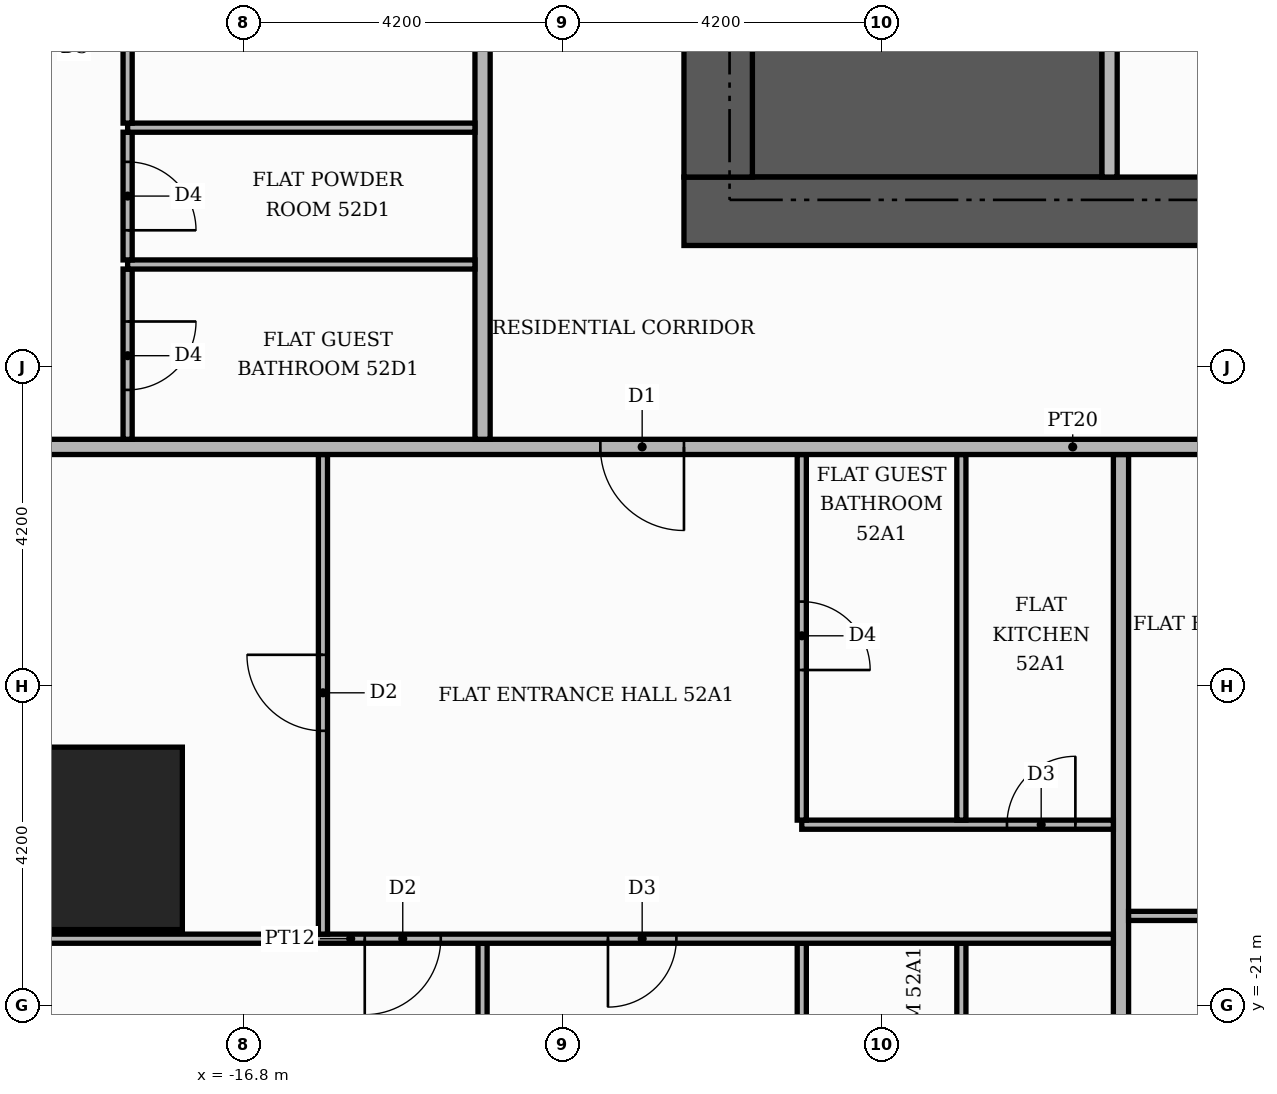
"""IFC4 building model, lengths in metres.
Left out: names, types, materials, properties, quantities, classifications, styles, units other than length and angle.
Written with IfcOpenShell. Run it as: python <this file> out.ifc"""

import sys

from ifc_helpers import new_model, si_unit, direction, frame, frame_2d, origin, origin_2d, place, context, subcontext, project, spatial, rectangle, extrude, element, fill, save


model = new_model("IFC4")
c1 = context("Model", 3, precision=1e-05, world=origin(), true_north=direction((0.0, 1.0)))
c2 = subcontext(c1, "Body", "Model", "MODEL_VIEW")
j1 = project(units=[si_unit("LENGTHUNIT", "METRE"), si_unit("PLANEANGLEUNIT", "RADIAN")], contexts=[c1])
p1 = place(None, origin())
s1 = spatial("IfcSite", under=j1, at=p1, CompositionType="ELEMENT")
p2 = place(p1, origin())
s2 = spatial("IfcBuilding", under=s1, at=p2, CompositionType="ELEMENT")
p3 = place(p2, frame((0.0, 0.0, 219.6)))
s3 = spatial("IfcBuildingStorey", under=s2, at=p3, CompositionType="ELEMENT", Elevation=219.6)
p4 = place(p3, frame((-10.1, -9.15, 0.0), z_axis=(0.0, 0.0, 1.0), x_axis=(1.0, 0.0, 0.0)))
e1 = element("IfcWall", 1, at=p4, inside=s3, PredefinedType="SHEAR", context=c2, shape_type="SweptSolid", body=[
    extrude(rectangle(XDim=4.6, YDim=1.9, at=frame_2d((2.3, 0.0))), origin(), (0.0, 0.0, 1.0), 3.48),
])
p5 = place(p3, frame((-11.0, -10.55, 0.0), z_axis=(0.0, 0.0, 1.0), x_axis=(1.0, 0.0, 0.0)))
e2 = element("IfcWall", 2, at=p5, inside=s3, PredefinedType="SHEAR", context=c2, shape_type="SweptSolid", body=[
    extrude(rectangle(XDim=22.0, YDim=0.9, at=frame_2d((11.0, 0.0))), origin(), (0.0, 0.0, 1.0), 3.48),
])
p6 = place(p5, frame((7.4, 0.0, 0.0)))
e3 = element("IfcOpeningElement", 3, at=p6, cuts=e2, PredefinedType="OPENING", context=c2, shape_type="SweptSolid", body=[
    extrude(rectangle(XDim=1.8, YDim=2.2, at=frame_2d((0.9, 1.1))), frame((0.0, 0.46, 0.0), z_axis=(0.0, -1.0, 0.0), x_axis=(1.0, 0.0, 0.0)), (0.0, 0.0, 1.0), 0.92),
])
p7 = place(p3, frame((-10.55, -10.1, 0.0), z_axis=(0.0, 0.0, 1.0), x_axis=(0.0, 1.0, 0.0)))
e4 = element("IfcWall", 4, at=p7, inside=s3, PredefinedType="SHEAR", context=c2, shape_type="SweptSolid", body=[
    extrude(rectangle(XDim=20.2, YDim=0.9, at=frame_2d((10.1, 0.0))), origin(), (0.0, 0.0, 1.0), 3.48),
])
p8 = place(p3, frame((-18.8, -18.8, 0.0), z_axis=(0.0, 0.0, 1.0), x_axis=(1.0, 0.0, 0.0)))
e5 = element("IfcColumn", 5, at=p8, inside=s3, PredefinedType="COLUMN", context=c2, shape_type="SweptSolid", body=[
    extrude(rectangle(XDim=2.4, YDim=2.4, at=origin_2d()), origin(), (0.0, 0.0, 1.0), 3.9),
])
p9 = place(p3, frame((-5.4, -10.1, 0.0), z_axis=(0.0, 0.0, 1.0), x_axis=(0.0, 1.0, 0.0)))
e6 = element("IfcWall", 6, at=p9, inside=s3, PredefinedType="PARTITIONING", context=c2, shape_type="SweptSolid", body=[
    extrude(rectangle(XDim=4.6, YDim=0.2, at=frame_2d((2.3, 0.0))), origin(), (0.0, 0.0, 1.0), 3.48),
])
p10 = place(p9, frame((2.9, 0.0, 0.0)))
e7 = element("IfcOpeningElement", 7, at=p10, cuts=e6, PredefinedType="OPENING", context=c2, shape_type="SweptSolid", body=[
    extrude(rectangle(XDim=1.0, YDim=2.1, at=frame_2d((0.5, 1.05))), frame((0.0, 0.11, 0.0), z_axis=(0.0, -1.0, 0.0), x_axis=(1.0, 0.0, 0.0)), (0.0, 0.0, 1.0), 0.22),
])
p11 = place(p3, frame((-13.65, -25.42, 0.0), z_axis=(0.0, 0.0, 1.0), x_axis=(0.0, 1.0, 0.0)))
e8 = element("IfcWall", 8, at=p11, inside=s3, PredefinedType="PARTITIONING", context=c2, shape_type="SweptSolid", body=[
    extrude(rectangle(XDim=5.24, YDim=0.12, at=frame_2d((2.62, 0.0))), origin(), (0.0, 0.0, 1.0), 3.48),
])
p12 = place(p3, frame((-9.45, -25.42, 0.0), z_axis=(0.0, 0.0, 1.0), x_axis=(0.0, 1.0, 0.0)))
e9 = element("IfcWall", 9, at=p12, inside=s3, PredefinedType="PARTITIONING", context=c2, shape_type="SweptSolid", body=[
    extrude(rectangle(XDim=5.24, YDim=0.12, at=frame_2d((2.62, 0.0))), origin(), (0.0, 0.0, 1.0), 3.48),
])
p13 = place(p12, frame((2.05, 0.0, 0.0)))
e10 = element("IfcOpeningElement", 10, at=p13, cuts=e9, PredefinedType="OPENING", context=c2, shape_type="SweptSolid", body=[
    extrude(rectangle(XDim=0.9, YDim=2.1, at=frame_2d((0.45, 1.05))), frame((0.0, 0.07, 0.0), z_axis=(0.0, -1.0, 0.0), x_axis=(1.0, 0.0, 0.0)), (0.0, 0.0, 1.0), 0.14),
])
p14 = place(p3, frame((-7.35, -25.42, 0.0), z_axis=(0.0, 0.0, 1.0), x_axis=(0.0, 1.0, 0.0)))
e11 = element("IfcWall", 11, at=p14, inside=s3, PredefinedType="PARTITIONING", context=c2, shape_type="SweptSolid", body=[
    extrude(rectangle(XDim=5.24, YDim=0.12, at=frame_2d((2.62, 0.0))), origin(), (0.0, 0.0, 1.0), 3.48),
])
p15 = place(p14, frame((2.05, 0.0, 0.0)))
e12 = element("IfcOpeningElement", 12, at=p15, cuts=e11, PredefinedType="OPENING", context=c2, shape_type="SweptSolid", body=[
    extrude(rectangle(XDim=0.9, YDim=2.1, at=frame_2d((0.45, 1.05))), frame((0.0, 0.07, 0.0), z_axis=(0.0, -1.0, 0.0), x_axis=(1.0, 0.0, 0.0)), (0.0, 0.0, 1.0), 0.14),
])
p16 = place(p3, frame((-5.25, -25.42, 0.0), z_axis=(0.0, 0.0, 1.0), x_axis=(0.0, 1.0, 0.0)))
e13 = element("IfcWall", 13, at=p16, inside=s3, PredefinedType="PARTITIONING", context=c2, shape_type="SweptSolid", body=[
    extrude(rectangle(XDim=11.67, YDim=0.2, at=frame_2d((5.835, 0.0))), origin(), (0.0, 0.0, 1.0), 3.48),
])
p17 = place(p3, frame((-25.42, -20.12, 0.0), z_axis=(0.0, 0.0, 1.0), x_axis=(1.0, 0.0, 0.0)))
e14 = element("IfcWall", 14, at=p17, inside=s3, PredefinedType="PARTITIONING", context=c2, shape_type="SweptSolid", body=[
    extrude(rectangle(XDim=20.07, YDim=0.12, at=frame_2d((10.035, 0.0))), origin(), (0.0, 0.0, 1.0), 3.48),
])
p18 = place(p17, frame((10.22, 0.0, 0.0)))
e15 = element("IfcOpeningElement", 15, at=p18, cuts=e14, PredefinedType="OPENING", context=c2, shape_type="SweptSolid", body=[
    extrude(rectangle(XDim=1.0, YDim=2.1, at=frame_2d((0.5, 1.05))), frame((0.0, 0.07, 0.0), z_axis=(0.0, -1.0, 0.0), x_axis=(1.0, 0.0, 0.0)), (0.0, 0.0, 1.0), 0.14),
])
p19 = place(p17, frame((13.42, 0.0, 0.0)))
e16 = element("IfcOpeningElement", 16, at=p19, cuts=e14, PredefinedType="OPENING", context=c2, shape_type="SweptSolid", body=[
    extrude(rectangle(XDim=0.9, YDim=2.1, at=frame_2d((0.45, 1.05))), frame((0.0, 0.07, 0.0), z_axis=(0.0, -1.0, 0.0), x_axis=(1.0, 0.0, 0.0)), (0.0, 0.0, 1.0), 0.14),
])
p20 = place(p3, frame((-15.75, -20.06, 0.0), z_axis=(0.0, 0.0, 1.0), x_axis=(0.0, 1.0, 0.0)))
e17 = element("IfcWall", 17, at=p20, inside=s3, PredefinedType="PARTITIONING", context=c2, shape_type="SweptSolid", body=[
    extrude(rectangle(XDim=6.31, YDim=0.12, at=frame_2d((3.155, 0.0))), origin(), (0.0, 0.0, 1.0), 3.48),
])
p21 = place(p20, frame((2.675, 0.0, 0.0)))
e18 = element("IfcOpeningElement", 18, at=p21, cuts=e17, PredefinedType="OPENING", context=c2, shape_type="SweptSolid", body=[
    extrude(rectangle(XDim=1.0, YDim=2.1, at=frame_2d((0.5, 1.05))), frame((0.0, 0.07, 0.0), z_axis=(0.0, -1.0, 0.0), x_axis=(1.0, 0.0, 0.0)), (0.0, 0.0, 1.0), 0.14),
])
p22 = place(p3, frame((-5.15, -19.82, 0.0), z_axis=(0.0, 0.0, 1.0), x_axis=(1.0, 0.0, 0.0)))
e19 = element("IfcWall", 19, at=p22, inside=s3, PredefinedType="PARTITIONING", context=c2, shape_type="SweptSolid", body=[
    extrude(rectangle(XDim=18.7, YDim=0.12, at=frame_2d((9.35, 0.0))), origin(), (0.0, 0.0, 1.0), 3.48),
])
p23 = place(p22, frame((3.65, 0.0, 0.0)))
e20 = element("IfcOpeningElement", 20, at=p23, cuts=e19, PredefinedType="OPENING", context=c2, shape_type="SweptSolid", body=[
    extrude(rectangle(XDim=0.9, YDim=2.1, at=frame_2d((0.45, 1.05))), frame((0.0, 0.07, 0.0), z_axis=(0.0, -1.0, 0.0), x_axis=(1.0, 0.0, 0.0)), (0.0, 0.0, 1.0), 0.14),
])
p24 = place(p22, frame((15.15, 0.0, 0.0)))
e21 = element("IfcOpeningElement", 21, at=p24, cuts=e19, PredefinedType="OPENING", context=c2, shape_type="SweptSolid", body=[
    extrude(rectangle(XDim=1.0, YDim=2.1, at=frame_2d((0.5, 1.05))), frame((0.0, 0.07, 0.0), z_axis=(0.0, -1.0, 0.0), x_axis=(1.0, 0.0, 0.0)), (0.0, 0.0, 1.0), 0.14),
])
p25 = place(p3, frame((-9.45, -18.62, 0.0), z_axis=(0.0, 0.0, 1.0), x_axis=(1.0, 0.0, 0.0)))
e22 = element("IfcWall", 22, at=p25, inside=s3, PredefinedType="PARTITIONING", context=c2, shape_type="SweptSolid", body=[
    extrude(rectangle(XDim=4.1, YDim=0.12, at=frame_2d((2.05, 0.0))), origin(), (0.0, 0.0, 1.0), 3.48),
])
p26 = place(p25, frame((2.7, 0.0, 0.0)))
e23 = element("IfcOpeningElement", 23, at=p26, cuts=e22, PredefinedType="OPENING", context=c2, shape_type="SweptSolid", body=[
    extrude(rectangle(XDim=0.9, YDim=2.1, at=frame_2d((0.45, 1.05))), frame((0.0, 0.07, 0.0), z_axis=(0.0, -1.0, 0.0), x_axis=(1.0, 0.0, 0.0)), (0.0, 0.0, 1.0), 0.14),
])
p27 = place(p3, frame((-9.45, -18.56, 0.0), z_axis=(0.0, 0.0, 1.0), x_axis=(0.0, 1.0, 0.0)))
e24 = element("IfcWall", 24, at=p27, inside=s3, PredefinedType="PARTITIONING", context=c2, shape_type="SweptSolid", body=[
    extrude(rectangle(XDim=4.81, YDim=0.12, at=frame_2d((2.405, 0.0))), origin(), (0.0, 0.0, 1.0), 3.48),
])
p28 = place(p27, frame((1.975, 0.0, 0.0)))
e25 = element("IfcOpeningElement", 25, at=p28, cuts=e24, PredefinedType="OPENING", context=c2, shape_type="SweptSolid", body=[
    extrude(rectangle(XDim=0.9, YDim=2.1, at=frame_2d((0.45, 1.05))), frame((0.0, 0.07, 0.0), z_axis=(0.0, -1.0, 0.0), x_axis=(1.0, 0.0, 0.0)), (0.0, 0.0, 1.0), 0.14),
])
p29 = place(p3, frame((-7.35, -18.56, 0.0), z_axis=(0.0, 0.0, 1.0), x_axis=(0.0, 1.0, 0.0)))
e26 = element("IfcWall", 26, at=p29, inside=s3, PredefinedType="PARTITIONING", context=c2, shape_type="SweptSolid", body=[
    extrude(rectangle(XDim=4.81, YDim=0.12, at=frame_2d((2.405, 0.0))), origin(), (0.0, 0.0, 1.0), 3.48),
])
p30 = place(p3, frame((-25.42, -13.65, 0.0), z_axis=(0.0, 0.0, 1.0), x_axis=(1.0, 0.0, 0.0)))
e27 = element("IfcWall", 27, at=p30, inside=s3, PredefinedType="PARTITIONING", context=c2, shape_type="SweptSolid", body=[
    extrude(rectangle(XDim=39.07, YDim=0.2, at=frame_2d((19.535, 0.0))), origin(), (0.0, 0.0, 1.0), 3.48),
])
p31 = place(p30, frame((13.32, 0.0, 0.0)))
e28 = element("IfcOpeningElement", 28, at=p31, cuts=e27, PredefinedType="OPENING", context=c2, shape_type="SweptSolid", body=[
    extrude(rectangle(XDim=1.1, YDim=2.4, at=frame_2d((0.55, 1.2))), frame((0.0, 0.11, 0.0), z_axis=(0.0, -1.0, 0.0), x_axis=(1.0, 0.0, 0.0)), (0.0, 0.0, 1.0), 0.22),
])
p32 = place(p30, frame((21.72, 0.0, 0.0)))
e29 = element("IfcOpeningElement", 29, at=p32, cuts=e27, PredefinedType="OPENING", context=c2, shape_type="SweptSolid", body=[
    extrude(rectangle(XDim=1.1, YDim=2.4, at=frame_2d((0.55, 1.2))), frame((0.0, 0.11, 0.0), z_axis=(0.0, -1.0, 0.0), x_axis=(1.0, 0.0, 0.0)), (0.0, 0.0, 1.0), 0.22),
])
p33 = place(p3, frame((-18.32, -13.55, 0.0), z_axis=(0.0, 0.0, 1.0), x_axis=(0.0, 1.0, 0.0)))
e30 = element("IfcWall", 30, at=p33, inside=s3, PredefinedType="PARTITIONING", context=c2, shape_type="SweptSolid", body=[
    extrude(rectangle(XDim=2.24, YDim=0.12, at=frame_2d((1.12, 0.0))), origin(), (0.0, 0.0, 1.0), 3.48),
])
p34 = place(p33, frame((0.65, 0.0, 0.0)))
e31 = element("IfcOpeningElement", 31, at=p34, cuts=e30, PredefinedType="OPENING", context=c2, shape_type="SweptSolid", body=[
    extrude(rectangle(XDim=0.9, YDim=2.1, at=frame_2d((0.45, 1.05))), frame((0.0, 0.07, 0.0), z_axis=(0.0, -1.0, 0.0), x_axis=(1.0, 0.0, 0.0)), (0.0, 0.0, 1.0), 0.14),
])
p35 = place(p3, frame((-13.65, -13.55, 0.0), z_axis=(0.0, 0.0, 1.0), x_axis=(0.0, 1.0, 0.0)))
e32 = element("IfcWall", 32, at=p35, inside=s3, PredefinedType="PARTITIONING", context=c2, shape_type="SweptSolid", body=[
    extrude(rectangle(XDim=27.1, YDim=0.2, at=frame_2d((13.55, 0.0))), origin(), (0.0, 0.0, 1.0), 3.48),
])
p36 = place(p35, frame((23.5, 0.0, 0.0)))
e33 = element("IfcOpeningElement", 33, at=p36, cuts=e32, PredefinedType="OPENING", context=c2, shape_type="SweptSolid", body=[
    extrude(rectangle(XDim=1.1, YDim=2.4, at=frame_2d((0.55, 1.2))), frame((0.0, 0.11, 0.0), z_axis=(0.0, -1.0, 0.0), x_axis=(1.0, 0.0, 0.0)), (0.0, 0.0, 1.0), 0.22),
])
p37 = place(p3, frame((-18.32, -11.25, 0.0), z_axis=(0.0, 0.0, 1.0), x_axis=(1.0, 0.0, 0.0)))
e34 = element("IfcWall", 34, at=p37, inside=s3, PredefinedType="PARTITIONING", context=c2, shape_type="SweptSolid", body=[
    extrude(rectangle(XDim=4.57, YDim=0.12, at=frame_2d((2.285, 0.0))), origin(), (0.0, 0.0, 1.0), 3.48),
])
p38 = place(p3, frame((-18.32, -11.19, 0.0), z_axis=(0.0, 0.0, 1.0), x_axis=(0.0, 1.0, 0.0)))
e35 = element("IfcWall", 35, at=p38, inside=s3, PredefinedType="PARTITIONING", context=c2, shape_type="SweptSolid", body=[
    extrude(rectangle(XDim=1.68, YDim=0.12, at=frame_2d((0.84, 0.0))), origin(), (0.0, 0.0, 1.0), 3.48),
])
p39 = place(p38, frame((0.39, 0.0, 0.0)))
e36 = element("IfcOpeningElement", 36, at=p39, cuts=e35, PredefinedType="OPENING", context=c2, shape_type="SweptSolid", body=[
    extrude(rectangle(XDim=0.9, YDim=2.1, at=frame_2d((0.45, 1.05))), frame((0.0, 0.07, 0.0), z_axis=(0.0, -1.0, 0.0), x_axis=(1.0, 0.0, 0.0)), (0.0, 0.0, 1.0), 0.14),
])
p40 = place(p3, frame((-18.32, -9.45, 0.0), z_axis=(0.0, 0.0, 1.0), x_axis=(1.0, 0.0, 0.0)))
e37 = element("IfcWall", 37, at=p40, inside=s3, PredefinedType="PARTITIONING", context=c2, shape_type="SweptSolid", body=[
    extrude(rectangle(XDim=4.57, YDim=0.12, at=frame_2d((2.285, 0.0))), origin(), (0.0, 0.0, 1.0), 3.48),
])
p41 = place(p3, frame((-18.32, -9.39, 0.0), z_axis=(0.0, 0.0, 1.0), x_axis=(0.0, 1.0, 0.0)))
e38 = element("IfcWall", 38, at=p41, inside=s3, PredefinedType="PARTITIONING", context=c2, shape_type="SweptSolid", body=[
    extrude(rectangle(XDim=6.18, YDim=0.12, at=frame_2d((3.09, 0.0))), origin(), (0.0, 0.0, 1.0), 3.48),
])
p42 = place(p41, frame((2.64, 0.0, 0.0)))
e39 = element("IfcOpeningElement", 39, at=p42, cuts=e38, PredefinedType="OPENING", context=c2, shape_type="SweptSolid", body=[
    extrude(rectangle(XDim=0.9, YDim=2.1, at=frame_2d((0.45, 1.05))), frame((0.0, 0.07, 0.0), z_axis=(0.0, -1.0, 0.0), x_axis=(1.0, 0.0, 0.0)), (0.0, 0.0, 1.0), 0.14),
])
p43 = place(p31, frame((1.1, 0.0, 0.0), z_axis=(0.0, 0.0, 1.0), x_axis=(-1.0, 0.0, 0.0)))
e40 = element("IfcDoor", 40, at=p43, inside=s3, OperationType="SINGLE_SWING_RIGHT", PredefinedType="DOOR", context=c2, shape_type="SweptSolid", body=[
    extrude(rectangle(XDim=1.1, YDim=2.4, at=frame_2d((0.55, 1.2))), frame((0.0, 0.025, 0.0), z_axis=(0.0, -1.0, 0.0), x_axis=(1.0, 0.0, 0.0)), (0.0, 0.0, 1.0), 0.05),
])
fill(e28, e40)
p44 = place(p21, origin())
e41 = element("IfcDoor", 41, at=p44, inside=s3, OperationType="SINGLE_SWING_RIGHT", PredefinedType="DOOR", context=c2, shape_type="SweptSolid", body=[
    extrude(rectangle(XDim=1.0, YDim=2.1, at=frame_2d((0.5, 1.05))), frame((0.0, 0.025, 0.0), z_axis=(0.0, -1.0, 0.0), x_axis=(1.0, 0.0, 0.0)), (0.0, 0.0, 1.0), 0.05),
])
fill(e18, e41)
p45 = place(p28, frame((0.9, 0.0, 0.0), z_axis=(0.0, 0.0, 1.0), x_axis=(-1.0, 0.0, 0.0)))
e42 = element("IfcDoor", 42, at=p45, inside=s3, OperationType="SINGLE_SWING_LEFT", PredefinedType="DOOR", context=c2, shape_type="SweptSolid", body=[
    extrude(rectangle(XDim=0.9, YDim=2.1, at=frame_2d((0.45, 1.05))), frame((0.0, 0.025, 0.0), z_axis=(0.0, -1.0, 0.0), x_axis=(1.0, 0.0, 0.0)), (0.0, 0.0, 1.0), 0.05),
])
fill(e25, e42)
p46 = place(p26, origin())
e43 = element("IfcDoor", 43, at=p46, inside=s3, OperationType="SINGLE_SWING_RIGHT", PredefinedType="DOOR", context=c2, shape_type="SweptSolid", body=[
    extrude(rectangle(XDim=0.9, YDim=2.1, at=frame_2d((0.45, 1.05))), frame((0.0, 0.025, 0.0), z_axis=(0.0, -1.0, 0.0), x_axis=(1.0, 0.0, 0.0)), (0.0, 0.0, 1.0), 0.05),
])
fill(e23, e43)
p47 = place(p18, frame((1.0, 0.0, 0.0), z_axis=(0.0, 0.0, 1.0), x_axis=(-1.0, 0.0, 0.0)))
e44 = element("IfcDoor", 44, at=p47, inside=s3, OperationType="SINGLE_SWING_LEFT", PredefinedType="DOOR", context=c2, shape_type="SweptSolid", body=[
    extrude(rectangle(XDim=1.0, YDim=2.1, at=frame_2d((0.5, 1.05))), frame((0.0, 0.025, 0.0), z_axis=(0.0, -1.0, 0.0), x_axis=(1.0, 0.0, 0.0)), (0.0, 0.0, 1.0), 0.05),
])
fill(e15, e44)
p48 = place(p19, frame((0.9, 0.0, 0.0), z_axis=(0.0, 0.0, 1.0), x_axis=(-1.0, 0.0, 0.0)))
e45 = element("IfcDoor", 45, at=p48, inside=s3, OperationType="SINGLE_SWING_LEFT", PredefinedType="DOOR", context=c2, shape_type="SweptSolid", body=[
    extrude(rectangle(XDim=0.9, YDim=2.1, at=frame_2d((0.45, 1.05))), frame((0.0, 0.025, 0.0), z_axis=(0.0, -1.0, 0.0), x_axis=(1.0, 0.0, 0.0)), (0.0, 0.0, 1.0), 0.05),
])
fill(e16, e45)
p49 = place(p39, frame((0.9, 0.0, 0.0), z_axis=(0.0, 0.0, 1.0), x_axis=(-1.0, 0.0, 0.0)))
e46 = element("IfcDoor", 46, at=p49, inside=s3, OperationType="SINGLE_SWING_LEFT", PredefinedType="DOOR", context=c2, shape_type="SweptSolid", body=[
    extrude(rectangle(XDim=0.9, YDim=2.1, at=frame_2d((0.45, 1.05))), frame((0.0, 0.025, 0.0), z_axis=(0.0, -1.0, 0.0), x_axis=(1.0, 0.0, 0.0)), (0.0, 0.0, 1.0), 0.05),
])
fill(e36, e46)
p50 = place(p34, frame((0.9, 0.0, 0.0), z_axis=(0.0, 0.0, 1.0), x_axis=(-1.0, 0.0, 0.0)))
e47 = element("IfcDoor", 47, at=p50, inside=s3, OperationType="SINGLE_SWING_RIGHT", PredefinedType="DOOR", context=c2, shape_type="SweptSolid", body=[
    extrude(rectangle(XDim=0.9, YDim=2.1, at=frame_2d((0.45, 1.05))), frame((0.0, 0.025, 0.0), z_axis=(0.0, -1.0, 0.0), x_axis=(1.0, 0.0, 0.0)), (0.0, 0.0, 1.0), 0.05),
])
fill(e31, e47)
save(model, sys.argv[1])
